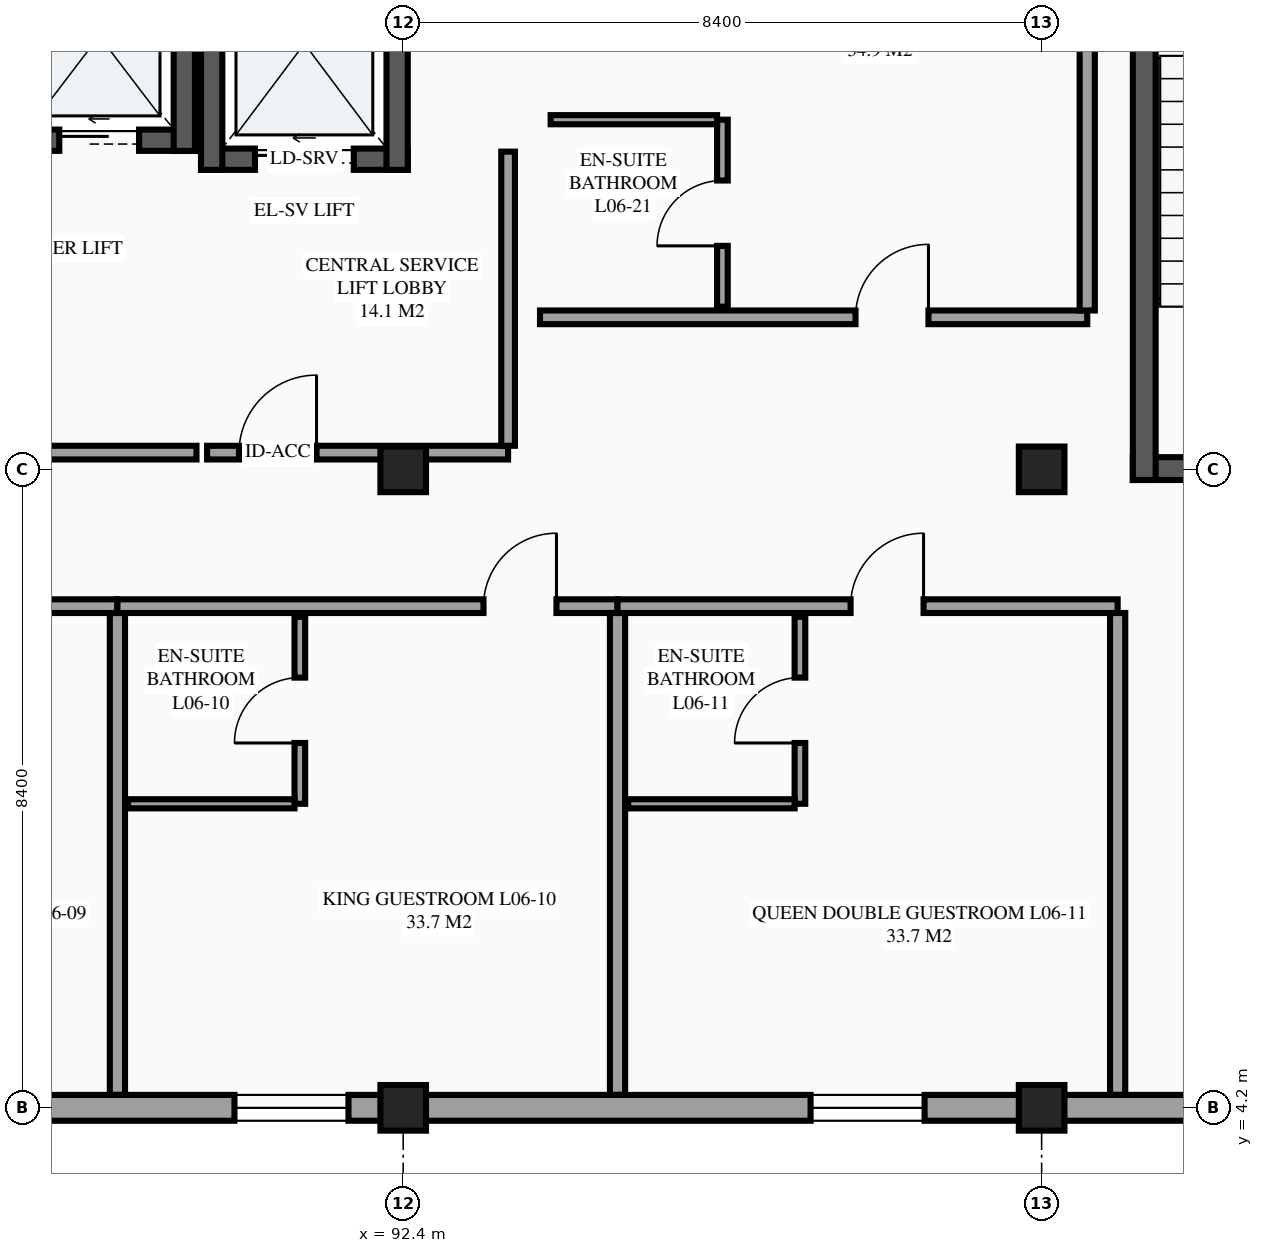
"""IFC4 building model, lengths in metres.
Left out: names, types, materials, properties, quantities, classifications, styles, units other than length and angle.
Written with IfcOpenShell. Run it as: python <this file> out.ifc"""

import sys

from ifc_helpers import new_model, si_unit, direction, frame, frame_2d, origin, origin_2d, place, context, subcontext, project, spatial, rectangle, extrude, element, fill, save


model = new_model("IFC4")
c1 = context("Model", 3, precision=1e-05, world=origin(), true_north=direction((0.0, 1.0)))
c2 = subcontext(c1, "Body", "Model", "MODEL_VIEW")
j1 = project(units=[si_unit("LENGTHUNIT", "METRE"), si_unit("PLANEANGLEUNIT", "RADIAN")], contexts=[c1])
p1 = place(None, origin())
s1 = spatial("IfcSite", under=j1, at=p1, CompositionType="ELEMENT")
p2 = place(p1, origin())
s2 = spatial("IfcBuilding", under=s1, at=p2, CompositionType="ELEMENT")
p3 = place(p2, frame((0.0, 0.0, 25.5)))
s3 = spatial("IfcBuildingStorey", under=s2, at=p3, CompositionType="ELEMENT", Elevation=25.5)
for number, where, z_axis, x_axis in (
    (1, (92.4, 4.2, 0.0), (0.0, 0.0, 1.0), (1.0, 0.0, 0.0)),
    (2, (92.4, 12.6, 0.0), (0.0, 0.0, 1.0), (1.0, 0.0, 0.0)),
    (3, (100.8, 4.2, 0.0), (0.0, 0.0, 1.0), (1.0, 0.0, 0.0)),
    (4, (100.8, 12.6, 0.0), (0.0, 0.0, 1.0), (1.0, 0.0, 0.0)),
):
    element("IfcColumn", number, at=place(p3, frame(where, z_axis=z_axis, x_axis=x_axis)), inside=s3, PredefinedType="COLUMN", context=c2, shape_type="SweptSolid", body=[
        extrude(rectangle(XDim=0.6, YDim=0.6, at=origin_2d()), origin(), (0.0, 0.0, 1.0), 3.6),
    ])
p4 = place(p3, frame((87.14, 16.93, 0.0), z_axis=(0.0, 0.0, 1.0), x_axis=(1.0, 0.0, 0.0)))
e5 = element("IfcWall", 5, at=p4, inside=s3, PredefinedType="SHEAR", context=c2, shape_type="SweptSolid", body=[
    extrude(rectangle(XDim=2.52, YDim=0.28, at=frame_2d((1.26, 0.0))), origin(), (0.0, 0.0, 1.0), 3.6),
])
p5 = place(p4, frame((0.735, 0.0, 0.0)))
e6 = element("IfcOpeningElement", 6, at=p5, cuts=e5, PredefinedType="OPENING", context=c2, shape_type="SweptSolid", body=[
    extrude(rectangle(XDim=1.05, YDim=2.2, at=frame_2d((0.525, 1.1))), frame((0.0, 0.15, 0.0), z_axis=(0.0, -1.0, 0.0), x_axis=(1.0, 0.0, 0.0)), (0.0, 0.0, 1.0), 0.3),
])
p6 = place(p3, frame((89.52, 16.79, 0.0), z_axis=(0.0, 0.0, 1.0), x_axis=(0.0, 1.0, 0.0)))
e7 = element("IfcWall", 7, at=p6, inside=s3, PredefinedType="SHEAR", context=c2, shape_type="SweptSolid", body=[
    extrude(rectangle(XDim=3.02, YDim=0.28, at=frame_2d((1.51, 0.0))), origin(), (0.0, 0.0, 1.0), 3.6),
])
p7 = place(p3, frame((89.74, 16.68, 0.0), z_axis=(0.0, 0.0, 1.0), x_axis=(1.0, 0.0, 0.0)))
e8 = element("IfcWall", 8, at=p7, inside=s3, PredefinedType="SHEAR", context=c2, shape_type="SweptSolid", body=[
    extrude(rectangle(XDim=2.72, YDim=0.28, at=frame_2d((1.36, 0.0))), origin(), (0.0, 0.0, 1.0), 3.6),
])
p8 = place(p7, frame((0.71, 0.0, 0.0)))
e9 = element("IfcOpeningElement", 9, at=p8, cuts=e8, PredefinedType="OPENING", context=c2, shape_type="SweptSolid", body=[
    extrude(rectangle(XDim=1.3, YDim=2.25, at=frame_2d((0.65, 1.125))), frame((0.0, 0.15, 0.0), z_axis=(0.0, -1.0, 0.0), x_axis=(1.0, 0.0, 0.0)), (0.0, 0.0, 1.0), 0.3),
])
for number, where, z_axis, x_axis in (
    (10, (92.32, 16.54, 0.0), (0.0, 0.0, 1.0), (0.0, 1.0, 0.0)),
    (11, (89.88, 19.86, 0.0), (0.0, 0.0, 1.0), (0.0, -1.0, 0.0)),
):
    element("IfcWall", number, at=place(p3, frame(where, z_axis=z_axis, x_axis=x_axis)), inside=s3, PredefinedType="SHEAR", context=c2, shape_type="SweptSolid", body=[
        extrude(rectangle(XDim=3.32, YDim=0.28, at=frame_2d((1.66, 0.0))), origin(), (0.0, 0.0, 1.0), 3.6),
    ])
p9 = place(p3, frame((102.0, 12.61, 0.0), z_axis=(0.0, 0.0, 1.0), x_axis=(1.0, 0.0, 0.0)))
e12 = element("IfcWall", 12, at=p9, inside=s3, PredefinedType="SHEAR", context=c2, shape_type="SweptSolid", body=[
    extrude(rectangle(XDim=5.2, YDim=0.3, at=frame_2d((2.6, 0.0))), origin(), (0.0, 0.0, 1.0), 3.6),
])
p10 = place(p9, frame((2.025, 0.0, 0.0)))
e13 = element("IfcOpeningElement", 13, at=p10, cuts=e12, PredefinedType="OPENING", context=c2, shape_type="SweptSolid", body=[
    extrude(rectangle(XDim=1.15, YDim=2.15, at=frame_2d((0.575, 1.075))), frame((0.0, 0.16, 0.0), z_axis=(0.0, -1.0, 0.0), x_axis=(1.0, 0.0, 0.0)), (0.0, 0.0, 1.0), 0.32),
])
p11 = place(p3, frame((102.15, 21.3, 0.0), z_axis=(0.0, 0.0, 1.0), x_axis=(0.0, -1.0, 0.0)))
e14 = element("IfcWall", 14, at=p11, inside=s3, PredefinedType="SHEAR", context=c2, shape_type="SweptSolid", body=[
    extrude(rectangle(XDim=8.84, YDim=0.3, at=frame_2d((4.42, 0.0))), origin(), (0.0, 0.0, 1.0), 3.6),
])
p12 = place(p3, frame((82.06, 10.8, 0.0), z_axis=(0.0, 0.0, 1.0), x_axis=(1.0, 0.0, 0.0)))
e15 = element("IfcWall", 15, at=p12, inside=s3, PredefinedType="PARTITIONING", context=c2, shape_type="SweptSolid", body=[
    extrude(rectangle(XDim=6.58, YDim=0.18, at=frame_2d((3.29, 0.0))), origin(), (0.0, 0.0, 1.0), 3.375),
])
p13 = place(p12, frame((4.467, 0.0, 0.0)))
e16 = element("IfcOpeningElement", 16, at=p13, cuts=e15, PredefinedType="OPENING", context=c2, shape_type="SweptSolid", body=[
    extrude(rectangle(XDim=0.96, YDim=2.15, at=frame_2d((0.48, 1.075))), frame((0.0, 0.1, 0.0), z_axis=(0.0, -1.0, 0.0), x_axis=(1.0, 0.0, 0.0)), (0.0, 0.0, 1.0), 0.2),
])
p14 = place(p3, frame((88.64, 4.37, 0.0), z_axis=(0.0, 0.0, 1.0), x_axis=(0.0, 1.0, 0.0)))
e17 = element("IfcWall", 17, at=p14, inside=s3, PredefinedType="PARTITIONING", context=c2, shape_type="SweptSolid", body=[
    extrude(rectangle(XDim=6.34, YDim=0.2, at=frame_2d((3.17, 0.0))), origin(), (0.0, 0.0, 1.0), 3.375),
])
p15 = place(p3, frame((88.64, 10.8, 0.0), z_axis=(0.0, 0.0, 1.0), x_axis=(1.0, 0.0, 0.0)))
e18 = element("IfcWall", 18, at=p15, inside=s3, PredefinedType="PARTITIONING", context=c2, shape_type="SweptSolid", body=[
    extrude(rectangle(XDim=6.58, YDim=0.18, at=frame_2d((3.29, 0.0))), origin(), (0.0, 0.0, 1.0), 3.375),
])
p16 = place(p15, frame((4.817, 0.0, 0.0)))
e19 = element("IfcOpeningElement", 19, at=p16, cuts=e18, PredefinedType="OPENING", context=c2, shape_type="SweptSolid", body=[
    extrude(rectangle(XDim=0.96, YDim=2.15, at=frame_2d((0.48, 1.075))), frame((0.0, 0.1, 0.0), z_axis=(0.0, -1.0, 0.0), x_axis=(1.0, 0.0, 0.0)), (0.0, 0.0, 1.0), 0.2),
])
p17 = place(p3, frame((95.22, 4.37, 0.0), z_axis=(0.0, 0.0, 1.0), x_axis=(0.0, 1.0, 0.0)))
e20 = element("IfcWall", 20, at=p17, inside=s3, PredefinedType="PARTITIONING", context=c2, shape_type="SweptSolid", body=[
    extrude(rectangle(XDim=6.34, YDim=0.2, at=frame_2d((3.17, 0.0))), origin(), (0.0, 0.0, 1.0), 3.375),
])
p18 = place(p3, frame((91.04, 8.2, 0.0), z_axis=(0.0, 0.0, 1.0), x_axis=(0.0, 1.0, 0.0)))
e21 = element("IfcWall", 21, at=p18, inside=s3, PredefinedType="PARTITIONING", context=c2, shape_type="SweptSolid", body=[
    extrude(rectangle(XDim=2.46, YDim=0.14, at=frame_2d((1.23, 0.0))), origin(), (0.0, 0.0, 1.0), 3.375),
])
p19 = place(p18, frame((0.8, 0.0, 0.0)))
e22 = element("IfcOpeningElement", 22, at=p19, cuts=e21, PredefinedType="OPENING", context=c2, shape_type="SweptSolid", body=[
    extrude(rectangle(XDim=0.86, YDim=2.1, at=frame_2d((0.43, 1.05))), frame((0.0, 0.08, 0.0), z_axis=(0.0, -1.0, 0.0), x_axis=(1.0, 0.0, 0.0)), (0.0, 0.0, 1.0), 0.16),
])
p20 = place(p3, frame((88.78, 8.2, 0.0), z_axis=(0.0, 0.0, 1.0), x_axis=(1.0, 0.0, 0.0)))
e23 = element("IfcWall", 23, at=p20, inside=s3, PredefinedType="PARTITIONING", context=c2, shape_type="SweptSolid", body=[
    extrude(rectangle(XDim=2.19, YDim=0.12, at=frame_2d((1.095, 0.0))), origin(), (0.0, 0.0, 1.0), 3.375),
])
p21 = place(p3, frame((95.22, 10.8, 0.0), z_axis=(0.0, 0.0, 1.0), x_axis=(1.0, 0.0, 0.0)))
e24 = element("IfcWall", 24, at=p21, inside=s3, PredefinedType="PARTITIONING", context=c2, shape_type="SweptSolid", body=[
    extrude(rectangle(XDim=6.58, YDim=0.18, at=frame_2d((3.29, 0.0))), origin(), (0.0, 0.0, 1.0), 3.375),
])
p22 = place(p21, frame((3.067, 0.0, 0.0)))
e25 = element("IfcOpeningElement", 25, at=p22, cuts=e24, PredefinedType="OPENING", context=c2, shape_type="SweptSolid", body=[
    extrude(rectangle(XDim=0.96, YDim=2.15, at=frame_2d((0.48, 1.075))), frame((0.0, 0.1, 0.0), z_axis=(0.0, -1.0, 0.0), x_axis=(1.0, 0.0, 0.0)), (0.0, 0.0, 1.0), 0.2),
])
p23 = place(p3, frame((101.8, 4.37, 0.0), z_axis=(0.0, 0.0, 1.0), x_axis=(0.0, 1.0, 0.0)))
e26 = element("IfcWall", 26, at=p23, inside=s3, PredefinedType="PARTITIONING", context=c2, shape_type="SweptSolid", body=[
    extrude(rectangle(XDim=6.34, YDim=0.2, at=frame_2d((3.17, 0.0))), origin(), (0.0, 0.0, 1.0), 3.375),
])
p24 = place(p3, frame((97.62, 8.2, 0.0), z_axis=(0.0, 0.0, 1.0), x_axis=(0.0, 1.0, 0.0)))
e27 = element("IfcWall", 27, at=p24, inside=s3, PredefinedType="PARTITIONING", context=c2, shape_type="SweptSolid", body=[
    extrude(rectangle(XDim=2.46, YDim=0.14, at=frame_2d((1.23, 0.0))), origin(), (0.0, 0.0, 1.0), 3.375),
])
p25 = place(p24, frame((0.8, 0.0, 0.0)))
e28 = element("IfcOpeningElement", 28, at=p25, cuts=e27, PredefinedType="OPENING", context=c2, shape_type="SweptSolid", body=[
    extrude(rectangle(XDim=0.86, YDim=2.1, at=frame_2d((0.43, 1.05))), frame((0.0, 0.08, 0.0), z_axis=(0.0, -1.0, 0.0), x_axis=(1.0, 0.0, 0.0)), (0.0, 0.0, 1.0), 0.16),
])
p26 = place(p3, frame((95.36, 8.2, 0.0), z_axis=(0.0, 0.0, 1.0), x_axis=(1.0, 0.0, 0.0)))
e29 = element("IfcWall", 29, at=p26, inside=s3, PredefinedType="PARTITIONING", context=c2, shape_type="SweptSolid", body=[
    extrude(rectangle(XDim=2.19, YDim=0.12, at=frame_2d((1.095, 0.0))), origin(), (0.0, 0.0, 1.0), 3.375),
])
p27 = place(p3, frame((94.2, 14.6, 0.0), z_axis=(0.0, 0.0, 1.0), x_axis=(1.0, 0.0, 0.0)))
e30 = element("IfcWall", 30, at=p27, inside=s3, PredefinedType="PARTITIONING", context=c2, shape_type="SweptSolid", body=[
    extrude(rectangle(XDim=7.2, YDim=0.18, at=frame_2d((3.6, 0.0))), origin(), (0.0, 0.0, 1.0), 3.375),
])
p28 = place(p27, frame((4.151, 0.0, 0.0)))
e31 = element("IfcOpeningElement", 31, at=p28, cuts=e30, PredefinedType="OPENING", context=c2, shape_type="SweptSolid", body=[
    extrude(rectangle(XDim=0.96, YDim=2.15, at=frame_2d((0.48, 1.075))), frame((0.0, 0.1, 0.0), z_axis=(0.0, -1.0, 0.0), x_axis=(1.0, 0.0, 0.0)), (0.0, 0.0, 1.0), 0.2),
])
p29 = place(p3, frame((101.4, 14.69, 0.0), z_axis=(0.0, 0.0, 1.0), x_axis=(0.0, 1.0, 0.0)))
e32 = element("IfcWall", 32, at=p29, inside=s3, PredefinedType="PARTITIONING", context=c2, shape_type="SweptSolid", body=[
    extrude(rectangle(XDim=6.14, YDim=0.2, at=frame_2d((3.07, 0.0))), origin(), (0.0, 0.0, 1.0), 3.375),
])
p30 = place(p3, frame((96.6, 14.74, 0.0), z_axis=(0.0, 0.0, 1.0), x_axis=(0.0, 1.0, 0.0)))
e33 = element("IfcWall", 33, at=p30, inside=s3, PredefinedType="PARTITIONING", context=c2, shape_type="SweptSolid", body=[
    extrude(rectangle(XDim=2.46, YDim=0.14, at=frame_2d((1.23, 0.0))), origin(), (0.0, 0.0, 1.0), 3.375),
])
p31 = place(p30, frame((0.8, 0.0, 0.0)))
e34 = element("IfcOpeningElement", 34, at=p31, cuts=e33, PredefinedType="OPENING", context=c2, shape_type="SweptSolid", body=[
    extrude(rectangle(XDim=0.86, YDim=2.1, at=frame_2d((0.43, 1.05))), frame((0.0, 0.08, 0.0), z_axis=(0.0, -1.0, 0.0), x_axis=(1.0, 0.0, 0.0)), (0.0, 0.0, 1.0), 0.16),
])
p32 = place(p3, frame((94.34, 17.2, 0.0), z_axis=(0.0, 0.0, 1.0), x_axis=(1.0, 0.0, 0.0)))
e35 = element("IfcWall", 35, at=p32, inside=s3, PredefinedType="PARTITIONING", context=c2, shape_type="SweptSolid", body=[
    extrude(rectangle(XDim=2.19, YDim=0.12, at=frame_2d((1.095, 0.0))), origin(), (0.0, 0.0, 1.0), 3.375),
])
p33 = place(p3, frame((84.22, 12.82, 0.0), z_axis=(0.0, 0.0, 1.0), x_axis=(1.0, 0.0, 0.0)))
e36 = element("IfcWall", 36, at=p33, inside=s3, PredefinedType="PARTITIONING", context=c2, shape_type="SweptSolid", body=[
    extrude(rectangle(XDim=5.46, YDim=0.18, at=frame_2d((2.73, 0.0))), origin(), (0.0, 0.0, 1.0), 3.375),
])
p34 = place(p33, frame((1.98, 0.0, 0.0)))
e37 = element("IfcOpeningElement", 37, at=p34, cuts=e36, PredefinedType="OPENING", context=c2, shape_type="SweptSolid", body=[
    extrude(rectangle(XDim=1.5, YDim=2.15, at=frame_2d((0.75, 1.075))), frame((0.0, 0.1, 0.0), z_axis=(0.0, -1.0, 0.0), x_axis=(1.0, 0.0, 0.0)), (0.0, 0.0, 1.0), 0.2),
])
p35 = place(p3, frame((89.82, 12.82, 0.0), z_axis=(0.0, 0.0, 1.0), x_axis=(1.0, 0.0, 0.0)))
e38 = element("IfcWall", 38, at=p35, inside=s3, PredefinedType="PARTITIONING", context=c2, shape_type="SweptSolid", body=[
    extrude(rectangle(XDim=3.96, YDim=0.18, at=frame_2d((1.98, 0.0))), origin(), (0.0, 0.0, 1.0), 3.375),
])
p36 = place(p35, frame((0.42, 0.0, 0.0)))
e39 = element("IfcOpeningElement", 39, at=p36, cuts=e38, PredefinedType="OPENING", context=c2, shape_type="SweptSolid", body=[
    extrude(rectangle(XDim=1.02, YDim=2.15, at=frame_2d((0.51, 1.075))), frame((0.0, 0.1, 0.0), z_axis=(0.0, -1.0, 0.0), x_axis=(1.0, 0.0, 0.0)), (0.0, 0.0, 1.0), 0.2),
])
p37 = place(p3, frame((93.78, 12.91, 0.0), z_axis=(0.0, 0.0, 1.0), x_axis=(0.0, 1.0, 0.0)))
e40 = element("IfcWall", 40, at=p37, inside=s3, PredefinedType="PARTITIONING", context=c2, shape_type="SweptSolid", body=[
    extrude(rectangle(XDim=3.87, YDim=0.18, at=frame_2d((1.935, 0.0))), origin(), (0.0, 0.0, 1.0), 3.375),
])
p38 = place(p3, frame((84.0, 4.2, 0.0), z_axis=(0.0, 0.0, 1.0), x_axis=(1.0, 0.0, 0.0)))
e41 = element("IfcWall", 41, at=p38, inside=s3, PredefinedType="STANDARD", context=c2, shape_type="SweptSolid", body=[
    extrude(rectangle(XDim=8.4, YDim=0.34, at=frame_2d((4.2, 0.0))), origin(), (0.0, 0.0, 1.0), 3.133),
])
p39 = place(p38, frame((0.85, 0.0, 0.85)))
e42 = element("IfcOpeningElement", 42, at=p39, cuts=e41, PredefinedType="OPENING", context=c2, shape_type="SweptSolid", body=[
    extrude(rectangle(XDim=1.5, YDim=1.5, at=frame_2d((0.75, 0.75))), frame((0.0, 0.18, 0.0), z_axis=(0.0, -1.0, 0.0), x_axis=(1.0, 0.0, 0.0)), (0.0, 0.0, 1.0), 0.36),
])
p40 = place(p38, frame((6.18, 0.0, 0.85)))
e43 = element("IfcOpeningElement", 43, at=p40, cuts=e41, PredefinedType="OPENING", context=c2, shape_type="SweptSolid", body=[
    extrude(rectangle(XDim=1.5, YDim=1.5, at=frame_2d((0.75, 0.75))), frame((0.0, 0.18, 0.0), z_axis=(0.0, -1.0, 0.0), x_axis=(1.0, 0.0, 0.0)), (0.0, 0.0, 1.0), 0.36),
])
p41 = place(p3, frame((92.4, 4.2, 0.0), z_axis=(0.0, 0.0, 1.0), x_axis=(1.0, 0.0, 0.0)))
e44 = element("IfcWall", 44, at=p41, inside=s3, PredefinedType="STANDARD", context=c2, shape_type="SweptSolid", body=[
    extrude(rectangle(XDim=16.8, YDim=0.34, at=frame_2d((8.4, 0.0))), origin(), (0.0, 0.0, 1.0), 2.53),
])
p42 = place(p41, frame((5.36, 0.0, 0.85)))
e45 = element("IfcOpeningElement", 45, at=p42, cuts=e44, PredefinedType="OPENING", context=c2, shape_type="SweptSolid", body=[
    extrude(rectangle(XDim=1.5, YDim=1.5, at=frame_2d((0.75, 0.75))), frame((0.0, 0.18, 0.0), z_axis=(0.0, -1.0, 0.0), x_axis=(1.0, 0.0, 0.0)), (0.0, 0.0, 1.0), 0.36),
])
p43 = place(p40, origin())
e46 = element("IfcWindow", 46, at=p43, inside=s3, PartitioningType="SINGLE_PANEL", PredefinedType="WINDOW", context=c2, shape_type="SweptSolid", body=[
    extrude(rectangle(XDim=1.5, YDim=1.5, at=frame_2d((0.75, 0.75))), frame((0.0, 0.03, 0.0), z_axis=(0.0, -1.0, 0.0), x_axis=(1.0, 0.0, 0.0)), (0.0, 0.0, 1.0), 0.06),
])
fill(e43, e46)
p44 = place(p42, origin())
e47 = element("IfcWindow", 47, at=p44, inside=s3, PartitioningType="SINGLE_PANEL", PredefinedType="WINDOW", context=c2, shape_type="SweptSolid", body=[
    extrude(rectangle(XDim=1.5, YDim=1.5, at=frame_2d((0.75, 0.75))), frame((0.0, 0.03, 0.0), z_axis=(0.0, -1.0, 0.0), x_axis=(1.0, 0.0, 0.0)), (0.0, 0.0, 1.0), 0.06),
])
fill(e45, e47)
p45 = place(p5, origin())
e48 = element("IfcDoor", 48, at=p45, inside=s3, OperationType="SLIDING_TO_LEFT", PredefinedType="DOOR", context=c2, shape_type="SweptSolid", body=[
    extrude(rectangle(XDim=1.05, YDim=2.2, at=frame_2d((0.525, 1.1))), frame((0.0, 0.025, 0.0), z_axis=(0.0, -1.0, 0.0), x_axis=(1.0, 0.0, 0.0)), (0.0, 0.0, 1.0), 0.05),
])
fill(e6, e48)
p46 = place(p8, origin())
e49 = element("IfcDoor", 49, at=p46, inside=s3, OperationType="SLIDING_TO_LEFT", PredefinedType="DOOR", context=c2, shape_type="SweptSolid", body=[
    extrude(rectangle(XDim=1.3, YDim=2.25, at=frame_2d((0.65, 1.125))), frame((0.0, 0.025, 0.0), z_axis=(0.0, -1.0, 0.0), x_axis=(1.0, 0.0, 0.0)), (0.0, 0.0, 1.0), 0.05),
])
fill(e9, e49)
p47 = place(p16, origin())
e50 = element("IfcDoor", 50, at=p47, inside=s3, OperationType="SINGLE_SWING_RIGHT", PredefinedType="DOOR", context=c2, shape_type="SweptSolid", body=[
    extrude(rectangle(XDim=0.96, YDim=2.15, at=frame_2d((0.48, 1.075))), frame((0.0, 0.025, 0.0), z_axis=(0.0, -1.0, 0.0), x_axis=(1.0, 0.0, 0.0)), (0.0, 0.0, 1.0), 0.05),
])
fill(e19, e50)
p48 = place(p19, origin())
e51 = element("IfcDoor", 51, at=p48, inside=s3, OperationType="SINGLE_SWING_LEFT", PredefinedType="DOOR", context=c2, shape_type="SweptSolid", body=[
    extrude(rectangle(XDim=0.86, YDim=2.1, at=frame_2d((0.43, 1.05))), frame((0.0, 0.025, 0.0), z_axis=(0.0, -1.0, 0.0), x_axis=(1.0, 0.0, 0.0)), (0.0, 0.0, 1.0), 0.05),
])
fill(e22, e51)
p49 = place(p22, origin())
e52 = element("IfcDoor", 52, at=p49, inside=s3, OperationType="SINGLE_SWING_RIGHT", PredefinedType="DOOR", context=c2, shape_type="SweptSolid", body=[
    extrude(rectangle(XDim=0.96, YDim=2.15, at=frame_2d((0.48, 1.075))), frame((0.0, 0.025, 0.0), z_axis=(0.0, -1.0, 0.0), x_axis=(1.0, 0.0, 0.0)), (0.0, 0.0, 1.0), 0.05),
])
fill(e25, e52)
p50 = place(p25, origin())
e53 = element("IfcDoor", 53, at=p50, inside=s3, OperationType="SINGLE_SWING_LEFT", PredefinedType="DOOR", context=c2, shape_type="SweptSolid", body=[
    extrude(rectangle(XDim=0.86, YDim=2.1, at=frame_2d((0.43, 1.05))), frame((0.0, 0.025, 0.0), z_axis=(0.0, -1.0, 0.0), x_axis=(1.0, 0.0, 0.0)), (0.0, 0.0, 1.0), 0.05),
])
fill(e28, e53)
p51 = place(p28, origin())
e54 = element("IfcDoor", 54, at=p51, inside=s3, OperationType="SINGLE_SWING_RIGHT", PredefinedType="DOOR", context=c2, shape_type="SweptSolid", body=[
    extrude(rectangle(XDim=0.96, YDim=2.15, at=frame_2d((0.48, 1.075))), frame((0.0, 0.025, 0.0), z_axis=(0.0, -1.0, 0.0), x_axis=(1.0, 0.0, 0.0)), (0.0, 0.0, 1.0), 0.05),
])
fill(e31, e54)
p52 = place(p31, origin())
e55 = element("IfcDoor", 55, at=p52, inside=s3, OperationType="SINGLE_SWING_LEFT", PredefinedType="DOOR", context=c2, shape_type="SweptSolid", body=[
    extrude(rectangle(XDim=0.86, YDim=2.1, at=frame_2d((0.43, 1.05))), frame((0.0, 0.025, 0.0), z_axis=(0.0, -1.0, 0.0), x_axis=(1.0, 0.0, 0.0)), (0.0, 0.0, 1.0), 0.05),
])
fill(e34, e55)
p53 = place(p36, origin())
e56 = element("IfcDoor", 56, at=p53, inside=s3, OperationType="SINGLE_SWING_RIGHT", PredefinedType="DOOR", context=c2, shape_type="SweptSolid", body=[
    extrude(rectangle(XDim=1.02, YDim=2.15, at=frame_2d((0.51, 1.075))), frame((0.0, 0.025, 0.0), z_axis=(0.0, -1.0, 0.0), x_axis=(1.0, 0.0, 0.0)), (0.0, 0.0, 1.0), 0.05),
])
fill(e39, e56)
save(model, sys.argv[1])
